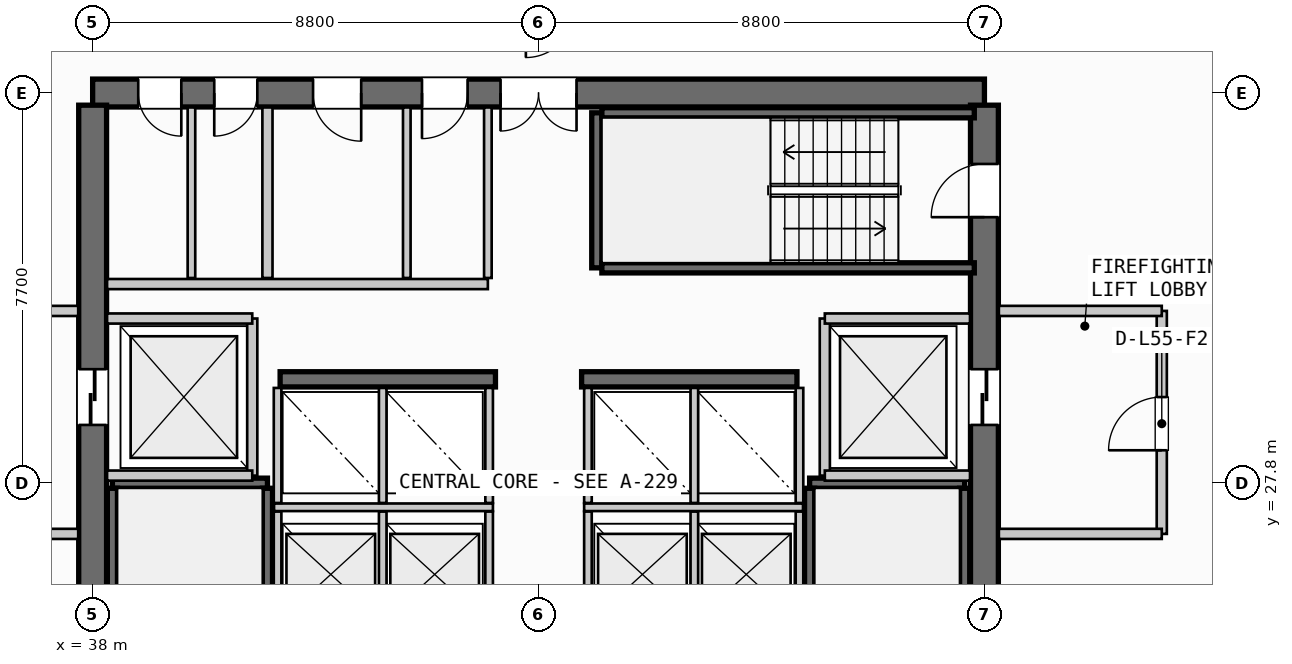
"""IFC4 building model, lengths in metres.
Left out: names, types, materials, properties, quantities, classifications, styles, units other than length and angle.
Written with IfcOpenShell. Run it as: python <this file> out.ifc"""

import sys

from ifc_helpers import new_model, si_unit, direction, frame, frame_2d, origin, place, context, subcontext, project, spatial, rectangle, extrude, source, transform, mapped, element, fill, save


model = new_model("IFC4")
c1 = context("Model", 3, precision=1e-05, world=origin(), true_north=direction((0.0, 1.0)))
c2 = subcontext(c1, "Body", "Model", "MODEL_VIEW")
j1 = project(units=[si_unit("LENGTHUNIT", "METRE"), si_unit("PLANEANGLEUNIT", "RADIAN")], contexts=[c1])
p1 = place(None, origin())
s1 = spatial("IfcSite", under=j1, at=p1, CompositionType="ELEMENT")
p2 = place(p1, origin())
s2 = spatial("IfcBuilding", under=s1, at=p2, CompositionType="ELEMENT")
p3 = place(p2, frame((0.0, 0.0, 211.4)))
s3 = spatial("IfcBuildingStorey", under=s2, at=p3, CompositionType="ELEMENT", Elevation=211.4)
p4 = place(p3, frame((55.6, 35.5, 0.0), z_axis=(0.0, 0.0, 1.0), x_axis=(-1.0, 0.0, 0.0)))
e1 = element("IfcWall", 1, at=p4, inside=s3, PredefinedType="SHEAR", context=c2, shape_type="SweptSolid", body=[
    extrude(rectangle(XDim=17.6, YDim=0.55, at=frame_2d((8.8, 0.0))), origin(), (0.0, 0.0, 1.0), 3.26),
])
p5 = place(p4, frame((8.05, 0.0, 0.0)))
e2 = element("IfcOpeningElement", 2, at=p5, cuts=e1, PredefinedType="OPENING", context=c2, shape_type="SweptSolid", body=[
    extrude(rectangle(XDim=1.5, YDim=2.2, at=frame_2d((0.75, 1.1))), frame((0.0, 0.285, 0.0), z_axis=(0.0, -1.0, 0.0), x_axis=(1.0, 0.0, 0.0)), (0.0, 0.0, 1.0), 0.57),
])
p6 = place(p4, frame((15.85, 0.0, 0.0)))
e3 = element("IfcOpeningElement", 3, at=p6, cuts=e1, PredefinedType="OPENING", context=c2, shape_type="SweptSolid", body=[
    extrude(rectangle(XDim=0.85, YDim=2.15, at=frame_2d((0.425, 1.075))), frame((0.0, 0.285, 0.0), z_axis=(0.0, -1.0, 0.0), x_axis=(1.0, 0.0, 0.0)), (0.0, 0.0, 1.0), 0.57),
])
p7 = place(p4, frame((14.35, 0.0, 0.0)))
e4 = element("IfcOpeningElement", 4, at=p7, cuts=e1, PredefinedType="OPENING", context=c2, shape_type="SweptSolid", body=[
    extrude(rectangle(XDim=0.85, YDim=2.15, at=frame_2d((0.425, 1.075))), frame((0.0, 0.285, 0.0), z_axis=(0.0, -1.0, 0.0), x_axis=(1.0, 0.0, 0.0)), (0.0, 0.0, 1.0), 0.57),
])
p8 = place(p4, frame((12.3, 0.0, 0.0)))
e5 = element("IfcOpeningElement", 5, at=p8, cuts=e1, PredefinedType="OPENING", context=c2, shape_type="SweptSolid", body=[
    extrude(rectangle(XDim=0.95, YDim=2.15, at=frame_2d((0.475, 1.075))), frame((0.0, 0.285, 0.0), z_axis=(0.0, -1.0, 0.0), x_axis=(1.0, 0.0, 0.0)), (0.0, 0.0, 1.0), 0.57),
])
p9 = place(p4, frame((10.2, 0.0, 0.0)))
e6 = element("IfcOpeningElement", 6, at=p9, cuts=e1, PredefinedType="OPENING", context=c2, shape_type="SweptSolid", body=[
    extrude(rectangle(XDim=0.9, YDim=2.15, at=frame_2d((0.45, 1.075))), frame((0.0, 0.285, 0.0), z_axis=(0.0, -1.0, 0.0), x_axis=(1.0, 0.0, 0.0)), (0.0, 0.0, 1.0), 0.57),
])
p10 = place(p3, frame((38.0, 35.26, 0.0), z_axis=(0.0, 0.0, 1.0), x_axis=(0.0, -1.0, 0.0)))
e7 = element("IfcWall", 7, at=p10, inside=s3, PredefinedType="SHEAR", context=c2, shape_type="SweptSolid", body=[
    extrude(rectangle(XDim=14.92, YDim=0.55, at=frame_2d((7.46, 0.0))), origin(), (0.0, 0.0, 1.0), 3.26),
])
p11 = place(p10, frame((5.21, 0.0, 0.0)))
e8 = element("IfcOpeningElement", 8, at=p11, cuts=e7, PredefinedType="OPENING", context=c2, shape_type="SweptSolid", body=[
    extrude(rectangle(XDim=1.1, YDim=2.2, at=frame_2d((0.55, 1.1))), frame((0.0, 0.285, 0.0), z_axis=(0.0, -1.0, 0.0), x_axis=(1.0, 0.0, 0.0)), (0.0, 0.0, 1.0), 0.57),
])
p12 = place(p3, frame((55.6, 20.34, 0.0), z_axis=(0.0, 0.0, 1.0), x_axis=(0.0, 1.0, 0.0)))
e9 = element("IfcWall", 9, at=p12, inside=s3, PredefinedType="SHEAR", context=c2, shape_type="SweptSolid", body=[
    extrude(rectangle(XDim=14.92, YDim=0.55, at=frame_2d((7.46, 0.0))), origin(), (0.0, 0.0, 1.0), 3.26),
])
p13 = place(p12, frame((12.71, 0.0, 0.0)))
e10 = element("IfcOpeningElement", 10, at=p13, cuts=e9, PredefinedType="OPENING", context=c2, shape_type="SweptSolid", body=[
    extrude(rectangle(XDim=1.05, YDim=2.15, at=frame_2d((0.525, 1.075))), frame((0.0, 0.285, 0.0), z_axis=(0.0, -1.0, 0.0), x_axis=(1.0, 0.0, 0.0)), (0.0, 0.0, 1.0), 0.57),
])
p14 = place(p12, frame((8.61, 0.0, 0.0)))
e11 = element("IfcOpeningElement", 11, at=p14, cuts=e9, PredefinedType="OPENING", context=c2, shape_type="SweptSolid", body=[
    extrude(rectangle(XDim=1.1, YDim=2.2, at=frame_2d((0.55, 1.1))), frame((0.0, 0.285, 0.0), z_axis=(0.0, -1.0, 0.0), x_axis=(1.0, 0.0, 0.0)), (0.0, 0.0, 1.0), 0.57),
])
for number, where, z_axis, x_axis in (
    (12, (41.7, 29.85, 0.0), (0.0, 0.0, 1.0), (1.0, 0.0, 0.0)),
    (13, (47.65, 29.85, 0.0), (0.0, 0.0, 1.0), (1.0, 0.0, 0.0)),
):
    element("IfcWall", number, at=place(p3, frame(where, z_axis=z_axis, x_axis=x_axis)), inside=s3, PredefinedType="SHEAR", context=c2, shape_type="SweptSolid", body=[
        extrude(rectangle(XDim=4.25, YDim=0.3, at=frame_2d((2.125, 0.0))), origin(), (0.0, 0.0, 1.0), 3.26),
    ])
p15 = place(p3, frame((38.39, 27.8, 0.0), z_axis=(0.0, 0.0, 1.0), x_axis=(1.0, 0.0, 0.0)))
e14 = element("IfcWall", 14, at=p15, inside=s3, PredefinedType="SHEAR", context=c2, shape_type="SweptSolid", body=[
    extrude(rectangle(XDim=3.06, YDim=0.2, at=frame_2d((1.53, 0.0))), origin(), (0.0, 0.0, 1.0), 3.26),
])
for number, where, z_axis, x_axis in (
    (15, (41.45, 27.7, 0.0), (0.0, 0.0, 1.0), (0.0, -1.0, 0.0)),
    (16, (38.39, 20.35, 0.0), (0.0, 0.0, 1.0), (0.0, 1.0, 0.0)),
):
    element("IfcWall", number, at=place(p3, frame(where, z_axis=z_axis, x_axis=x_axis)), inside=s3, PredefinedType="SHEAR", context=c2, shape_type="SweptSolid", body=[
        extrude(rectangle(XDim=7.35, YDim=0.2, at=frame_2d((3.675, 0.0))), origin(), (0.0, 0.0, 1.0), 3.26),
    ])
p16 = place(p3, frame((52.15, 27.8, 0.0), z_axis=(0.0, 0.0, 1.0), x_axis=(1.0, 0.0, 0.0)))
e17 = element("IfcWall", 17, at=p16, inside=s3, PredefinedType="SHEAR", context=c2, shape_type="SweptSolid", body=[
    extrude(rectangle(XDim=3.06, YDim=0.2, at=frame_2d((1.53, 0.0))), origin(), (0.0, 0.0, 1.0), 3.26),
])
for number, where, z_axis, x_axis in (
    (18, (55.21, 27.7, 0.0), (0.0, 0.0, 1.0), (0.0, -1.0, 0.0)),
    (19, (52.15, 20.35, 0.0), (0.0, 0.0, 1.0), (0.0, 1.0, 0.0)),
):
    element("IfcWall", number, at=place(p3, frame(where, z_axis=z_axis, x_axis=x_axis)), inside=s3, PredefinedType="SHEAR", context=c2, shape_type="SweptSolid", body=[
        extrude(rectangle(XDim=7.35, YDim=0.2, at=frame_2d((3.675, 0.0))), origin(), (0.0, 0.0, 1.0), 3.26),
    ])
p17 = place(p3, frame((47.95, 32.05, 0.0), z_axis=(0.0, 0.0, 1.0), x_axis=(0.0, 1.0, 0.0)))
e20 = element("IfcWall", 20, at=p17, inside=s3, PredefinedType="SHEAR", context=c2, shape_type="SweptSolid", body=[
    extrude(rectangle(XDim=3.06, YDim=0.2, at=frame_2d((1.53, 0.0))), origin(), (0.0, 0.0, 1.0), 3.26),
])
for number, where, z_axis, x_axis in (
    (21, (48.05, 35.11, 0.0), (0.0, 0.0, 1.0), (1.0, 0.0, 0.0)),
    (22, (55.4, 32.05, 0.0), (0.0, 0.0, 1.0), (-1.0, 0.0, 0.0)),
):
    element("IfcWall", number, at=place(p3, frame(where, z_axis=z_axis, x_axis=x_axis)), inside=s3, PredefinedType="SHEAR", context=c2, shape_type="SweptSolid", body=[
        extrude(rectangle(XDim=7.35, YDim=0.2, at=frame_2d((3.675, 0.0))), origin(), (0.0, 0.0, 1.0), 3.26),
    ])
p18 = place(p3, frame((41.15, 27.95, 0.0), z_axis=(0.0, 0.0, 1.0), x_axis=(0.0, 1.0, 0.0)))
e23 = element("IfcWall", 23, at=p18, inside=s3, PredefinedType="PARTITIONING", context=c2, shape_type="SweptSolid", body=[
    extrude(rectangle(XDim=3.1, YDim=0.2, at=frame_2d((1.55, 0.0))), origin(), (0.0, 0.0, 1.0), 2.455),
])
for number, where, z_axis, x_axis in (
    (24, (38.285, 27.95, 0.0), (0.0, 0.0, 1.0), (1.0, 0.0, 0.0)),
    (25, (38.285, 31.05, 0.0), (0.0, 0.0, 1.0), (1.0, 0.0, 0.0)),
):
    element("IfcWall", number, at=place(p3, frame(where, z_axis=z_axis, x_axis=x_axis)), inside=s3, PredefinedType="PARTITIONING", context=c2, shape_type="SweptSolid", body=[
        extrude(rectangle(XDim=2.865, YDim=0.2, at=frame_2d((1.433, 0.0))), origin(), (0.0, 0.0, 1.0), 2.455),
    ])
for number, where, z_axis, x_axis in (
    (26, (34.5, 26.8, 0.0), (0.0, 0.0, 1.0), (1.0, 0.0, 0.0)),
    (27, (34.5, 31.2, 0.0), (0.0, 0.0, 1.0), (1.0, 0.0, 0.0)),
):
    element("IfcWall", number, at=place(p3, frame(where, z_axis=z_axis, x_axis=x_axis)), inside=s3, PredefinedType="PARTITIONING", context=c2, shape_type="SweptSolid", body=[
        extrude(rectangle(XDim=3.215, YDim=0.2, at=frame_2d((1.607, 0.0))), origin(), (0.0, 0.0, 1.0), 2.455),
    ])
p19 = place(p3, frame((52.45, 27.95, 0.0), z_axis=(0.0, 0.0, 1.0), x_axis=(0.0, 1.0, 0.0)))
e28 = element("IfcWall", 28, at=p19, inside=s3, PredefinedType="PARTITIONING", context=c2, shape_type="SweptSolid", body=[
    extrude(rectangle(XDim=3.1, YDim=0.2, at=frame_2d((1.55, 0.0))), origin(), (0.0, 0.0, 1.0), 2.455),
])
for number, where, z_axis, x_axis in (
    (29, (52.45, 27.95, 0.0), (0.0, 0.0, 1.0), (1.0, 0.0, 0.0)),
    (30, (52.45, 31.05, 0.0), (0.0, 0.0, 1.0), (1.0, 0.0, 0.0)),
):
    element("IfcWall", number, at=place(p3, frame(where, z_axis=z_axis, x_axis=x_axis)), inside=s3, PredefinedType="PARTITIONING", context=c2, shape_type="SweptSolid", body=[
        extrude(rectangle(XDim=2.865, YDim=0.2, at=frame_2d((1.433, 0.0))), origin(), (0.0, 0.0, 1.0), 2.455),
    ])
p20 = place(p3, frame((59.1, 26.8, 0.0), z_axis=(0.0, 0.0, 1.0), x_axis=(0.0, 1.0, 0.0)))
e31 = element("IfcWall", 31, at=p20, inside=s3, PredefinedType="PARTITIONING", context=c2, shape_type="SweptSolid", body=[
    extrude(rectangle(XDim=4.4, YDim=0.2, at=frame_2d((2.2, 0.0))), origin(), (0.0, 0.0, 1.0), 2.455),
])
p21 = place(p20, frame((1.65, 0.0, 0.0)))
e32 = element("IfcOpeningElement", 32, at=p21, cuts=e31, PredefinedType="OPENING", context=c2, shape_type="SweptSolid", body=[
    extrude(rectangle(XDim=1.05, YDim=2.15, at=frame_2d((0.525, 1.075))), frame((0.0, 0.11, 0.0), z_axis=(0.0, -1.0, 0.0), x_axis=(1.0, 0.0, 0.0)), (0.0, 0.0, 1.0), 0.22),
])
for number, where, z_axis, x_axis in (
    (33, (55.885, 26.8, 0.0), (0.0, 0.0, 1.0), (1.0, 0.0, 0.0)),
    (34, (55.885, 31.2, 0.0), (0.0, 0.0, 1.0), (1.0, 0.0, 0.0)),
):
    element("IfcWall", number, at=place(p3, frame(where, z_axis=z_axis, x_axis=x_axis)), inside=s3, PredefinedType="PARTITIONING", context=c2, shape_type="SweptSolid", body=[
        extrude(rectangle(XDim=3.215, YDim=0.2, at=frame_2d((1.607, 0.0))), origin(), (0.0, 0.0, 1.0), 2.455),
    ])
p22 = place(p3, frame((41.58, 27.325, 0.0), z_axis=(0.0, 0.0, 1.0), x_axis=(1.0, 0.0, 0.0)))
e35 = element("IfcWall", 35, at=p22, inside=s3, PredefinedType="PARTITIONING", context=c2, shape_type="SweptSolid", body=[
    extrude(rectangle(XDim=4.32, YDim=0.15, at=frame_2d((2.16, 0.0))), origin(), (0.0, 0.0, 1.0), 2.455),
])
p23 = place(p3, frame((47.7, 27.325, 0.0), z_axis=(0.0, 0.0, 1.0), x_axis=(1.0, 0.0, 0.0)))
e36 = element("IfcWall", 36, at=p23, inside=s3, PredefinedType="PARTITIONING", context=c2, shape_type="SweptSolid", body=[
    extrude(rectangle(XDim=4.32, YDim=0.15, at=frame_2d((2.16, 0.0))), origin(), (0.0, 0.0, 1.0), 2.455),
])
for number, where, z_axis, x_axis in (
    (37, (41.65, 24.92, 0.0), (0.0, 0.0, 1.0), (0.0, 1.0, 0.0)),
    (38, (43.725, 24.92, 0.0), (0.0, 0.0, 1.0), (0.0, 1.0, 0.0)),
    (39, (45.825, 24.92, 0.0), (0.0, 0.0, 1.0), (0.0, 1.0, 0.0)),
    (40, (47.775, 24.92, 0.0), (0.0, 0.0, 1.0), (0.0, 1.0, 0.0)),
    (41, (49.875, 24.92, 0.0), (0.0, 0.0, 1.0), (0.0, 1.0, 0.0)),
    (42, (51.95, 24.92, 0.0), (0.0, 0.0, 1.0), (0.0, 1.0, 0.0)),
):
    element("IfcWall", number, at=place(p3, frame(where, z_axis=z_axis, x_axis=x_axis)), inside=s3, PredefinedType="PARTITIONING", context=c2, shape_type="SweptSolid", body=[
        extrude(rectangle(XDim=2.32, YDim=0.15, at=frame_2d((1.16, 0.0))), origin(), (0.0, 0.0, 1.0), 2.455),
    ])
for number, where, z_axis, x_axis in (
    (43, (41.65, 27.41, 0.0), (0.0, 0.0, 1.0), (0.0, 1.0, 0.0)),
    (44, (43.725, 27.41, 0.0), (0.0, 0.0, 1.0), (0.0, 1.0, 0.0)),
    (45, (45.825, 27.41, 0.0), (0.0, 0.0, 1.0), (0.0, 1.0, 0.0)),
    (46, (47.775, 27.41, 0.0), (0.0, 0.0, 1.0), (0.0, 1.0, 0.0)),
    (47, (49.875, 27.41, 0.0), (0.0, 0.0, 1.0), (0.0, 1.0, 0.0)),
    (48, (51.95, 27.41, 0.0), (0.0, 0.0, 1.0), (0.0, 1.0, 0.0)),
):
    element("IfcWall", number, at=place(p3, frame(where, z_axis=z_axis, x_axis=x_axis)), inside=s3, PredefinedType="PARTITIONING", context=c2, shape_type="SweptSolid", body=[
        extrude(rectangle(XDim=2.27, YDim=0.15, at=frame_2d((1.135, 0.0))), origin(), (0.0, 0.0, 1.0), 2.455),
    ])
p24 = place(p3, frame((41.45, 31.85, 0.0), z_axis=(0.0, 0.0, 1.0), x_axis=(0.0, 1.0, 0.0)))
e49 = element("IfcWall", 49, at=p24, inside=s3, PredefinedType="PARTITIONING", context=c2, shape_type="SweptSolid", body=[
    extrude(rectangle(XDim=3.365, YDim=0.2, at=frame_2d((1.683, 0.0))), origin(), (0.0, 0.0, 1.0), 2.455),
])
p25 = place(p3, frame((38.285, 31.73, 0.0), z_axis=(0.0, 0.0, 1.0), x_axis=(1.0, 0.0, 0.0)))
e50 = element("IfcWall", 50, at=p25, inside=s3, PredefinedType="PARTITIONING", context=c2, shape_type="SweptSolid", body=[
    extrude(rectangle(XDim=7.515, YDim=0.2, at=frame_2d((3.758, 0.0))), origin(), (0.0, 0.0, 1.0), 2.455),
])
for number, where, z_axis, x_axis in (
    (51, (45.8, 31.85, 0.0), (0.0, 0.0, 1.0), (0.0, 1.0, 0.0)),
    (52, (39.95, 31.85, 0.0), (0.0, 0.0, 1.0), (0.0, 1.0, 0.0)),
):
    element("IfcWall", number, at=place(p3, frame(where, z_axis=z_axis, x_axis=x_axis)), inside=s3, PredefinedType="PARTITIONING", context=c2, shape_type="SweptSolid", body=[
        extrude(rectangle(XDim=3.365, YDim=0.15, at=frame_2d((1.683, 0.0))), origin(), (0.0, 0.0, 1.0), 2.455),
    ])
p26 = place(p3, frame((44.2, 31.85, 0.0), z_axis=(0.0, 0.0, 1.0), x_axis=(0.0, 1.0, 0.0)))
e53 = element("IfcWall", 53, at=p26, inside=s3, PredefinedType="PLUMBINGWALL", context=c2, shape_type="SweptSolid", body=[
    extrude(rectangle(XDim=3.365, YDim=0.15, at=frame_2d((1.683, 0.0))), origin(), (0.0, 0.0, 1.0), 2.455),
])
m1 = source(origin(), c2, "Body", "SweptSolid", [
    extrude(rectangle(XDim=1.05, YDim=2.15, at=frame_2d((0.525, 1.075))), frame((0.0, 0.025, 0.0), z_axis=(0.0, -1.0, 0.0), x_axis=(1.0, 0.0, 0.0)), (0.0, 0.0, 1.0), 0.05),
])
p27 = place(p13, origin())
e54 = element("IfcDoor", 54, at=p27, inside=s3, OperationType="SINGLE_SWING_LEFT", PredefinedType="DOOR", context=c2, shape_type="MappedRepresentation", body=[
    mapped(m1, transform((0.0, 0.0, 0.0), scale=1.0)),
])
fill(e10, e54)
m2 = source(origin(), c2, "Body", "SweptSolid", [
    extrude(rectangle(XDim=1.5, YDim=2.2, at=frame_2d((0.75, 1.1))), frame((0.0, 0.025, 0.0), z_axis=(0.0, -1.0, 0.0), x_axis=(1.0, 0.0, 0.0)), (0.0, 0.0, 1.0), 0.05),
])
p28 = place(p5, origin())
e55 = element("IfcDoor", 55, at=p28, inside=s3, OperationType="DOUBLE_DOOR_SINGLE_SWING", PredefinedType="DOOR", context=c2, shape_type="MappedRepresentation", body=[
    mapped(m2, transform((0.0, 0.0, 0.0), scale=1.0)),
])
fill(e2, e55)
m3 = source(origin(), c2, "Body", "SweptSolid", [
    extrude(rectangle(XDim=1.1, YDim=2.2, at=frame_2d((0.55, 1.1))), frame((0.0, 0.025, 0.0), z_axis=(0.0, -1.0, 0.0), x_axis=(1.0, 0.0, 0.0)), (0.0, 0.0, 1.0), 0.05),
])
p29 = place(p11, origin())
e56 = element("IfcDoor", 56, at=p29, inside=s3, OperationType="SLIDING_TO_LEFT", PredefinedType="DOOR", context=c2, shape_type="MappedRepresentation", body=[
    mapped(m3, transform((0.0, 0.0, 0.0), scale=1.0)),
])
fill(e8, e56)
p30 = place(p14, origin())
e57 = element("IfcDoor", 57, at=p30, inside=s3, OperationType="SLIDING_TO_RIGHT", PredefinedType="DOOR", context=c2, shape_type="MappedRepresentation", body=[
    mapped(m3, transform((0.0, 0.0, 0.0), scale=1.0)),
])
fill(e11, e57)
m4 = source(origin(), c2, "Body", "SweptSolid", [
    extrude(rectangle(XDim=0.85, YDim=2.15, at=frame_2d((0.425, 1.075))), frame((0.0, 0.025, 0.0), z_axis=(0.0, -1.0, 0.0), x_axis=(1.0, 0.0, 0.0)), (0.0, 0.0, 1.0), 0.05),
])
p31 = place(p6, origin())
e58 = element("IfcDoor", 58, at=p31, inside=s3, OperationType="SINGLE_SWING_LEFT", PredefinedType="DOOR", context=c2, shape_type="MappedRepresentation", body=[
    mapped(m4, transform((0.0, 0.0, 0.0), scale=1.0)),
])
fill(e3, e58)
p32 = place(p7, origin())
e59 = element("IfcDoor", 59, at=p32, inside=s3, OperationType="SINGLE_SWING_RIGHT", PredefinedType="DOOR", context=c2, shape_type="MappedRepresentation", body=[
    mapped(m4, transform((0.0, 0.0, 0.0), scale=1.0)),
])
fill(e4, e59)
m5 = source(origin(), c2, "Body", "SweptSolid", [
    extrude(rectangle(XDim=0.95, YDim=2.15, at=frame_2d((0.475, 1.075))), frame((0.0, 0.025, 0.0), z_axis=(0.0, -1.0, 0.0), x_axis=(1.0, 0.0, 0.0)), (0.0, 0.0, 1.0), 0.05),
])
p33 = place(p8, origin())
e60 = element("IfcDoor", 60, at=p33, inside=s3, OperationType="SINGLE_SWING_LEFT", PredefinedType="DOOR", context=c2, shape_type="MappedRepresentation", body=[
    mapped(m5, transform((0.0, 0.0, 0.0), scale=1.0)),
])
fill(e5, e60)
m6 = source(origin(), c2, "Body", "SweptSolid", [
    extrude(rectangle(XDim=0.9, YDim=2.15, at=frame_2d((0.45, 1.075))), frame((0.0, 0.025, 0.0), z_axis=(0.0, -1.0, 0.0), x_axis=(1.0, 0.0, 0.0)), (0.0, 0.0, 1.0), 0.05),
])
p34 = place(p9, origin())
e61 = element("IfcDoor", 61, at=p34, inside=s3, OperationType="SINGLE_SWING_RIGHT", PredefinedType="DOOR", context=c2, shape_type="MappedRepresentation", body=[
    mapped(m6, transform((0.0, 0.0, 0.0), scale=1.0)),
])
fill(e6, e61)
p35 = place(p21, origin())
e62 = element("IfcDoor", 62, at=p35, inside=s3, OperationType="SINGLE_SWING_LEFT", PredefinedType="DOOR", context=c2, shape_type="MappedRepresentation", body=[
    mapped(m1, transform((0.0, 0.0, 0.0), scale=1.0)),
])
fill(e32, e62)
save(model, sys.argv[1])
